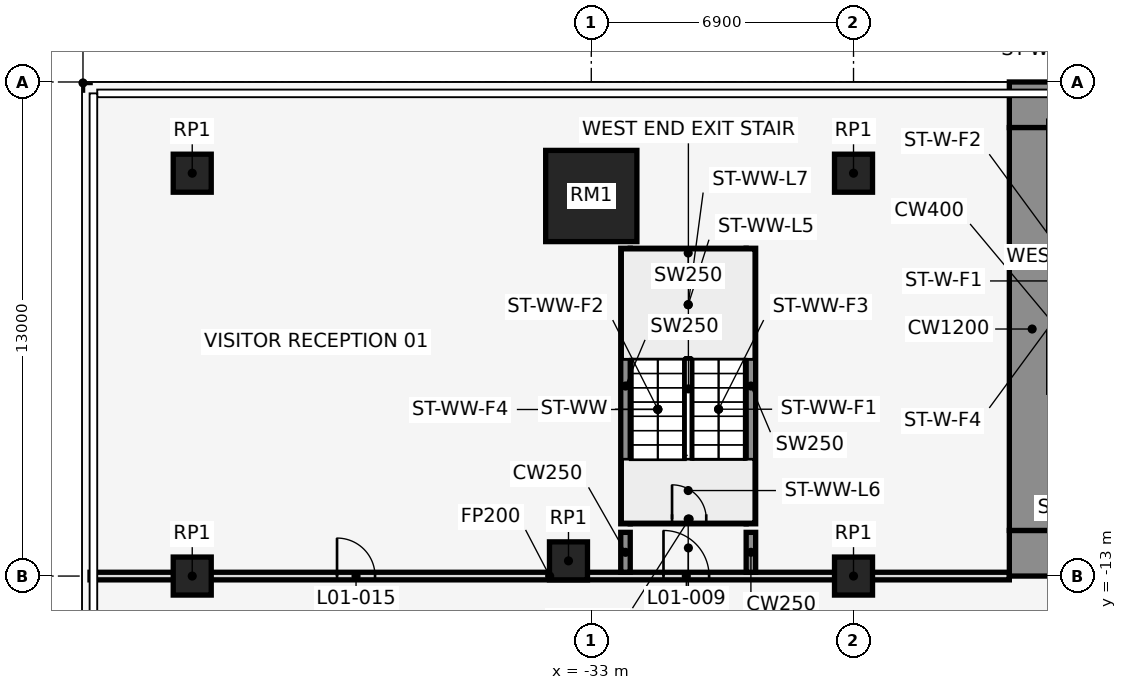
"""IFC4 building model, lengths in metres.
Left out: names, types, materials, properties, quantities, classifications, styles, units other than length and angle.
Written with IfcOpenShell. Run it as: python <this file> out.ifc"""

import sys

from ifc_helpers import new_model, si_unit, direction, frame, frame_2d, origin, origin_2d, place, context, subcontext, project, spatial, rectangle, extrude, element, fill, save


model = new_model("IFC4")
c1 = context("Model", 3, precision=1e-05, world=origin(), true_north=direction((0.0, 1.0)))
c2 = subcontext(c1, "Body", "Model", "MODEL_VIEW")
j1 = project(units=[si_unit("LENGTHUNIT", "METRE"), si_unit("PLANEANGLEUNIT", "RADIAN")], contexts=[c1])
p1 = place(None, origin())
s1 = spatial("IfcSite", under=j1, at=p1, CompositionType="ELEMENT")
p2 = place(p1, origin())
s2 = spatial("IfcBuilding", under=s1, at=p2, CompositionType="ELEMENT")
p3 = place(p2, frame((0.0, 0.0, 8.0)))
s3 = spatial("IfcBuildingStorey", under=s2, at=p3, CompositionType="ELEMENT", Elevation=8.0)
p4 = place(p3, frame((-33.0, -3.0, 0.0), z_axis=(0.0, 0.0, 1.0), x_axis=(1.0, 0.0, 0.0)))
e1 = element("IfcColumn", 1, at=p4, inside=s3, PredefinedType="COLUMN", context=c2, shape_type="SweptSolid", body=[
    extrude(rectangle(XDim=2.4, YDim=2.4, at=origin_2d()), origin(), (0.0, 0.0, 1.0), 6.0),
])
for number, where, z_axis, x_axis in (
    (2, (-26.1, -2.4, 0.0), (0.0, 0.0, 1.0), (1.0, 0.0, 0.0)),
    (3, (-33.6, -12.6, 0.0), (0.0, 0.0, 1.0), (1.0, 0.0, 0.0)),
    (4, (-43.5, -2.4, 0.0), (0.0, 0.0, 1.0), (1.0, 0.0, 0.0)),
    (5, (-43.5, -13.0, 0.0), (0.0, 0.0, 1.0), (1.0, 0.0, 0.0)),
    (6, (-26.1, -13.0, 0.0), (0.0, 0.0, 1.0), (1.0, 0.0, 0.0)),
):
    element("IfcColumn", number, at=place(p3, frame(where, z_axis=z_axis, x_axis=x_axis)), inside=s3, PredefinedType="COLUMN", context=c2, shape_type="SweptSolid", body=[
        extrude(rectangle(XDim=1.0, YDim=1.0, at=origin_2d()), origin(), (0.0, 0.0, 1.0), 6.0),
    ])
for number, where, z_axis, x_axis in (
    (7, (-32.1, -11.625, 0.0), (0.0, 0.0, 1.0), (0.0, 1.0, 0.0)),
    (8, (-28.8, -11.625, 0.0), (0.0, 0.0, 1.0), (0.0, 1.0, 0.0)),
):
    element("IfcWall", number, at=place(p3, frame(where, z_axis=z_axis, x_axis=x_axis)), inside=s3, PredefinedType="SHEAR", context=c2, shape_type="SweptSolid", body=[
        extrude(rectangle(XDim=7.25, YDim=0.25, at=frame_2d((3.625, 0.0))), origin(), (0.0, 0.0, 1.0), 6.0),
    ])
p5 = place(p3, frame((-31.975, -11.5, 0.0), z_axis=(0.0, 0.0, 1.0), x_axis=(1.0, 0.0, 0.0)))
e9 = element("IfcWall", 9, at=p5, inside=s3, PredefinedType="SHEAR", context=c2, shape_type="SweptSolid", body=[
    extrude(rectangle(XDim=3.05, YDim=0.25, at=frame_2d((1.525, 0.0))), origin(), (0.0, 0.0, 1.0), 6.0),
])
p6 = place(p5, frame((1.1, 0.0, 0.0)))
e10 = element("IfcOpeningElement", 10, at=p6, cuts=e9, PredefinedType="OPENING", context=c2, shape_type="SweptSolid", body=[
    extrude(rectangle(XDim=0.9, YDim=2.1, at=frame_2d((0.45, 1.05))), frame((0.0, 0.137, 0.0), z_axis=(0.0, -1.0, 0.0), x_axis=(1.0, 0.0, 0.0)), (0.0, 0.0, 1.0), 0.274),
])
p7 = place(p3, frame((-31.975, -4.5, 0.0), z_axis=(0.0, 0.0, 1.0), x_axis=(1.0, 0.0, 0.0)))
e11 = element("IfcWall", 11, at=p7, inside=s3, PredefinedType="SHEAR", context=c2, shape_type="SweptSolid", body=[
    extrude(rectangle(XDim=3.05, YDim=0.25, at=frame_2d((1.525, 0.0))), origin(), (0.0, 0.0, 1.0), 6.0),
])
p8 = place(p3, frame((-46.19, -13.0, 0.0), z_axis=(0.0, 0.0, 1.0), x_axis=(1.0, 0.0, 0.0)))
e12 = element("IfcWall", 12, at=p8, inside=s3, PredefinedType="PARTITIONING", context=c2, shape_type="SweptSolid", body=[
    extrude(rectangle(XDim=24.19, YDim=0.2, at=frame_2d((12.095, 0.0))), origin(), (0.0, 0.0, 1.0), 5.7),
])
p9 = place(p8, frame((15.09, 0.0, 0.0)))
e13 = element("IfcOpeningElement", 13, at=p9, cuts=e12, PredefinedType="OPENING", context=c2, shape_type="SweptSolid", body=[
    extrude(rectangle(XDim=1.2, YDim=2.1, at=frame_2d((0.6, 1.05))), frame((0.0, 0.112, 0.0), z_axis=(0.0, -1.0, 0.0), x_axis=(1.0, 0.0, 0.0)), (0.0, 0.0, 1.0), 0.224),
])
p10 = place(p8, frame((6.5, 0.0, 0.0)))
e14 = element("IfcOpeningElement", 14, at=p10, cuts=e12, PredefinedType="OPENING", context=c2, shape_type="SweptSolid", body=[
    extrude(rectangle(XDim=1.0, YDim=2.1, at=frame_2d((0.5, 1.05))), frame((0.0, 0.112, 0.0), z_axis=(0.0, -1.0, 0.0), x_axis=(1.0, 0.0, 0.0)), (0.0, 0.0, 1.0), 0.224),
])
for number, where, z_axis, x_axis in (
    (15, (-32.1, -12.9, 0.0), (0.0, 0.0, 1.0), (0.0, 1.0, 0.0)),
    (16, (-28.8, -12.9, 0.0), (0.0, 0.0, 1.0), (0.0, 1.0, 0.0)),
):
    element("IfcWall", number, at=place(p3, frame(where, z_axis=z_axis, x_axis=x_axis)), inside=s3, PredefinedType="SHEAR", context=c2, shape_type="SweptSolid", body=[
        extrude(rectangle(XDim=1.05, YDim=0.25, at=frame_2d((0.525, 0.0))), origin(), (0.0, 0.0, 1.0), 6.0),
    ])
p11 = place(p3, frame((-22.0, -0.6, 0.0), z_axis=(0.0, 0.0, 1.0), x_axis=(1.0, 0.0, 0.0)))
e17 = element("IfcWall", 17, at=p11, inside=s3, PredefinedType="SHEAR", context=c2, shape_type="SweptSolid", body=[
    extrude(rectangle(XDim=44.0, YDim=1.2, at=frame_2d((22.0, 0.0))), origin(), (0.0, 0.0, 1.0), 6.0),
])
p12 = place(p3, frame((-22.0, -12.4, 0.0), z_axis=(0.0, 0.0, 1.0), x_axis=(1.0, 0.0, 0.0)))
e18 = element("IfcWall", 18, at=p12, inside=s3, PredefinedType="SHEAR", context=c2, shape_type="SweptSolid", body=[
    extrude(rectangle(XDim=44.0, YDim=1.2, at=frame_2d((22.0, 0.0))), origin(), (0.0, 0.0, 1.0), 6.0),
])
p13 = place(p12, frame((2.2, 0.0, 0.0)))
e19 = element("IfcOpeningElement", 19, at=p13, cuts=e18, PredefinedType="OPENING", context=c2, shape_type="SweptSolid", body=[
    extrude(rectangle(XDim=1.2, YDim=2.1, at=frame_2d((0.6, 1.05))), frame((0.0, 0.612, 0.0), z_axis=(0.0, -1.0, 0.0), x_axis=(1.0, 0.0, 0.0)), (0.0, 0.0, 1.0), 1.224),
])
p14 = place(p12, frame((21.4, 0.0, 0.0)))
e20 = element("IfcOpeningElement", 20, at=p14, cuts=e18, PredefinedType="OPENING", context=c2, shape_type="SweptSolid", body=[
    extrude(rectangle(XDim=1.2, YDim=2.1, at=frame_2d((0.6, 1.05))), frame((0.0, 0.612, 0.0), z_axis=(0.0, -1.0, 0.0), x_axis=(1.0, 0.0, 0.0)), (0.0, 0.0, 1.0), 1.224),
])
p15 = place(p12, frame((40.6, 0.0, 0.0)))
e21 = element("IfcOpeningElement", 21, at=p15, cuts=e18, PredefinedType="OPENING", context=c2, shape_type="SweptSolid", body=[
    extrude(rectangle(XDim=1.2, YDim=2.1, at=frame_2d((0.6, 1.05))), frame((0.0, 0.612, 0.0), z_axis=(0.0, -1.0, 0.0), x_axis=(1.0, 0.0, 0.0)), (0.0, 0.0, 1.0), 1.224),
])
p16 = place(p12, frame((16.0, 0.0, 0.0)))
e22 = element("IfcOpeningElement", 22, at=p16, cuts=e18, PredefinedType="OPENING", context=c2, shape_type="SweptSolid", body=[
    extrude(rectangle(XDim=1.8, YDim=2.1, at=frame_2d((0.9, 1.05))), frame((0.0, 0.612, 0.0), z_axis=(0.0, -1.0, 0.0), x_axis=(1.0, 0.0, 0.0)), (0.0, 0.0, 1.0), 1.224),
])
p17 = place(p12, frame((6.3, 0.0, 0.0)))
e23 = element("IfcOpeningElement", 23, at=p17, cuts=e18, PredefinedType="OPENING", context=c2, shape_type="SweptSolid", body=[
    extrude(rectangle(XDim=1.2, YDim=2.1, at=frame_2d((0.6, 1.05))), frame((0.0, 0.612, 0.0), z_axis=(0.0, -1.0, 0.0), x_axis=(1.0, 0.0, 0.0)), (0.0, 0.0, 1.0), 1.224),
])
p18 = place(p12, frame((26.2, 0.0, 0.0)))
e24 = element("IfcOpeningElement", 24, at=p18, cuts=e18, PredefinedType="OPENING", context=c2, shape_type="SweptSolid", body=[
    extrude(rectangle(XDim=1.8, YDim=2.1, at=frame_2d((0.9, 1.05))), frame((0.0, 0.612, 0.0), z_axis=(0.0, -1.0, 0.0), x_axis=(1.0, 0.0, 0.0)), (0.0, 0.0, 1.0), 1.224),
])
p19 = place(p12, frame((36.5, 0.0, 0.0)))
e25 = element("IfcOpeningElement", 25, at=p19, cuts=e18, PredefinedType="OPENING", context=c2, shape_type="SweptSolid", body=[
    extrude(rectangle(XDim=1.2, YDim=2.1, at=frame_2d((0.6, 1.05))), frame((0.0, 0.612, 0.0), z_axis=(0.0, -1.0, 0.0), x_axis=(1.0, 0.0, 0.0)), (0.0, 0.0, 1.0), 1.224),
])
p20 = place(p3, frame((-21.4, -11.8, 0.0), z_axis=(0.0, 0.0, 1.0), x_axis=(0.0, 1.0, 0.0)))
e26 = element("IfcWall", 26, at=p20, inside=s3, PredefinedType="SHEAR", context=c2, shape_type="SweptSolid", body=[
    extrude(rectangle(XDim=10.6, YDim=1.2, at=frame_2d((5.3, 0.0))), origin(), (0.0, 0.0, 1.0), 6.0),
])
p21 = place(p9, origin())
e27 = element("IfcDoor", 27, at=p21, inside=s3, OperationType="SINGLE_SWING_RIGHT", PredefinedType="DOOR", context=c2, shape_type="SweptSolid", body=[
    extrude(rectangle(XDim=1.2, YDim=2.1, at=frame_2d((0.6, 1.05))), frame((0.0, 0.025, 0.0), z_axis=(0.0, -1.0, 0.0), x_axis=(1.0, 0.0, 0.0)), (0.0, 0.0, 1.0), 0.05),
])
fill(e13, e27)
p22 = place(p6, origin())
e28 = element("IfcDoor", 28, at=p22, inside=s3, OperationType="SINGLE_SWING_LEFT", PredefinedType="DOOR", context=c2, shape_type="SweptSolid", body=[
    extrude(rectangle(XDim=0.9, YDim=2.1, at=frame_2d((0.45, 1.05))), frame((0.0, 0.025, 0.0), z_axis=(0.0, -1.0, 0.0), x_axis=(1.0, 0.0, 0.0)), (0.0, 0.0, 1.0), 0.05),
])
fill(e10, e28)
p23 = place(p10, origin())
e29 = element("IfcDoor", 29, at=p23, inside=s3, OperationType="SINGLE_SWING_RIGHT", PredefinedType="DOOR", context=c2, shape_type="SweptSolid", body=[
    extrude(rectangle(XDim=1.0, YDim=2.1, at=frame_2d((0.5, 1.05))), frame((0.0, 0.025, 0.0), z_axis=(0.0, -1.0, 0.0), x_axis=(1.0, 0.0, 0.0)), (0.0, 0.0, 1.0), 0.05),
])
fill(e14, e29)
save(model, sys.argv[1])
